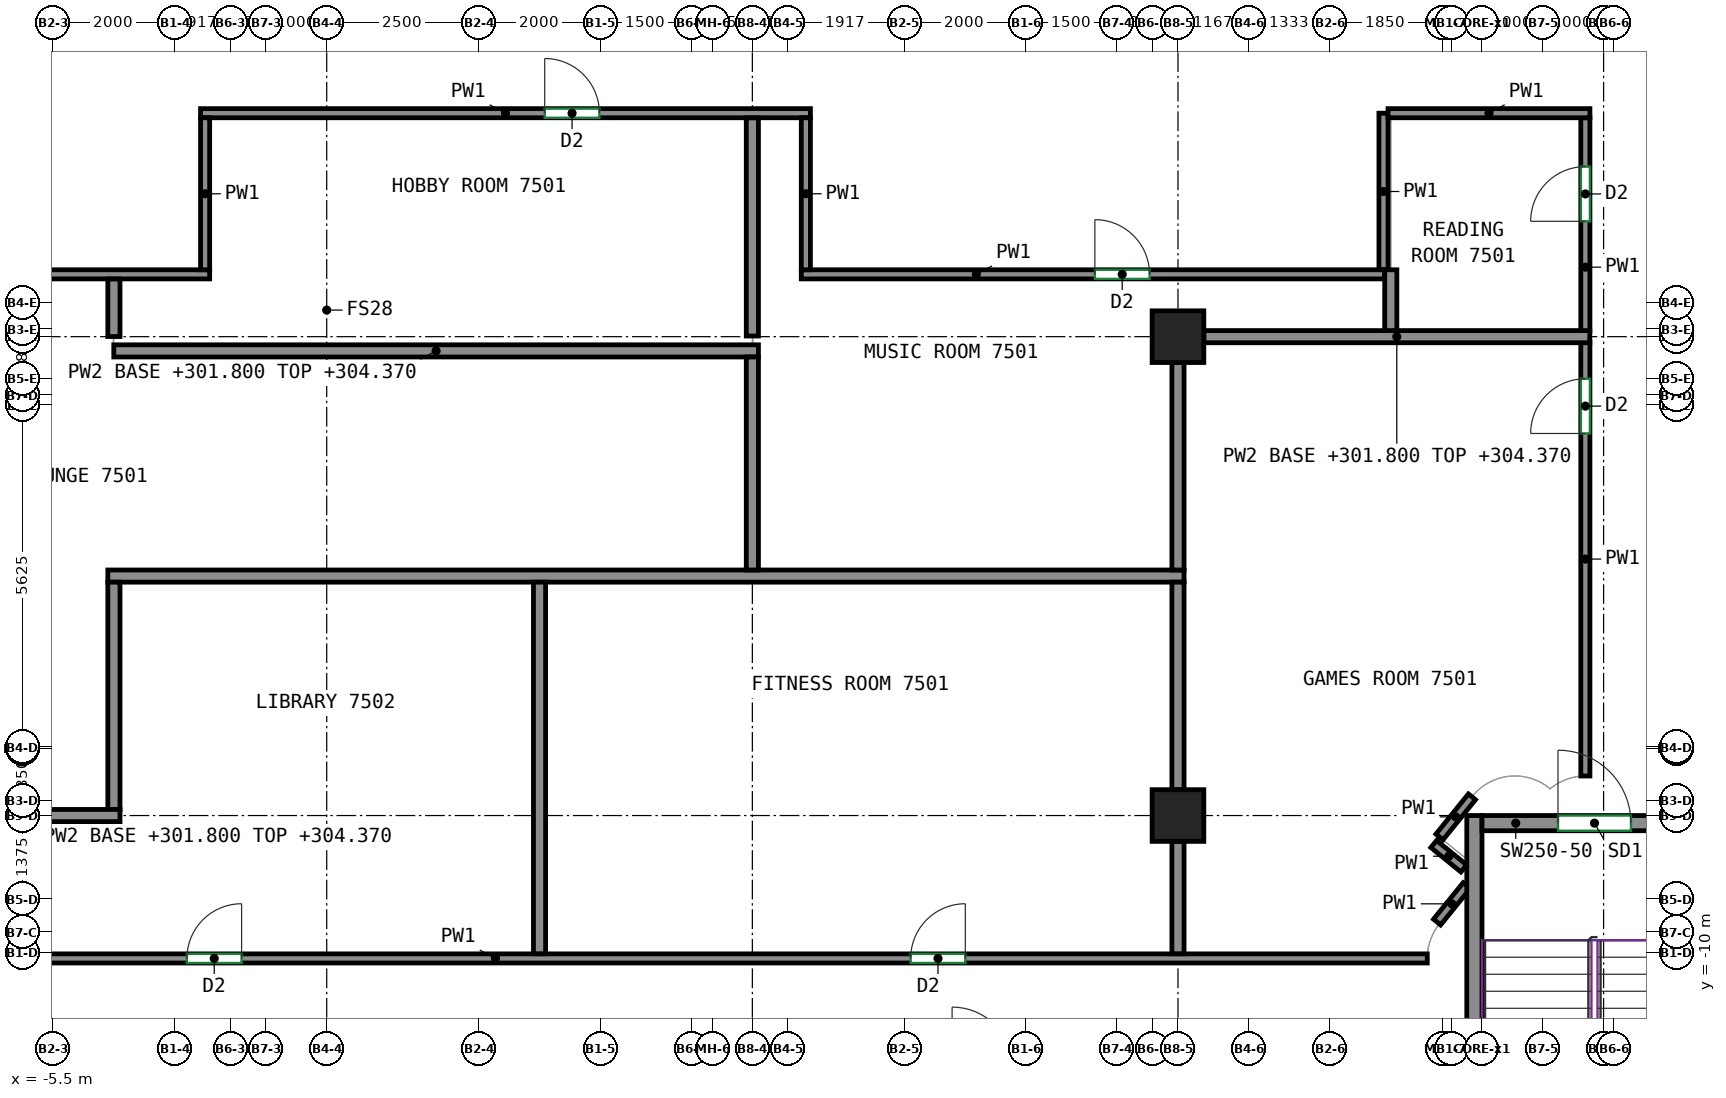
"""IFC4 building model, lengths in metres.
Left out: names, types, materials, properties, quantities, classifications, styles, units other than length and angle.
Written with IfcOpenShell. Run it as: python <this file> out.ifc"""

import sys

from ifc_helpers import new_model, si_unit, direction, frame, frame_2d, origin, origin_2d, place, context, subcontext, project, spatial, rectangle, extrude, source, transform, mapped, element, fill, save


model = new_model("IFC4")
c1 = context("Model", 3, precision=1e-05, world=origin(), true_north=direction((0.0, 1.0)))
c2 = subcontext(c1, "Body", "Model", "MODEL_VIEW")
j1 = project(units=[si_unit("LENGTHUNIT", "METRE"), si_unit("PLANEANGLEUNIT", "RADIAN")], contexts=[c1])
p1 = place(None, origin())
s1 = spatial("IfcSite", under=j1, at=p1, CompositionType="ELEMENT")
p2 = place(p1, origin())
s2 = spatial("IfcBuilding", under=s1, at=p2, CompositionType="ELEMENT")
p3 = place(p2, frame((0.0, 0.0, 301.8)))
s3 = spatial("IfcBuildingStorey", under=s2, at=p3, CompositionType="ELEMENT", Elevation=301.8)
m1 = source(origin(), c2, "Body", "SweptSolid", [
    extrude(rectangle(XDim=0.85, YDim=0.85, at=origin_2d()), origin(), (0.0, 0.0, 1.0), 3.12),
])
for number, where, z_axis, x_axis in (
    (1, (13.0, -7.75, 0.0), (0.0, 0.0, 1.0), (1.0, 0.0, 0.0)),
    (2, (13.0, 0.125, 0.0), (0.0, 0.0, 1.0), (1.0, 0.0, 0.0)),
):
    element("IfcColumn", number, at=place(p3, frame(where, z_axis=z_axis, x_axis=x_axis)), inside=s3, PredefinedType="COLUMN", context=c2, shape_type="MappedRepresentation", body=[
        mapped(m1, transform((0.0, 0.0, 0.0))),
    ])
m2 = source(origin(), c2, "Body", "SweptSolid", [
    extrude(rectangle(XDim=8.0, YDim=0.25, at=frame_2d((4.0, 0.0))), origin(), (0.0, 0.0, 1.0), 3.12),
])
p4 = place(p3, frame((17.875, -15.75, 0.0), z_axis=(0.0, 0.0, 1.0), x_axis=(0.0, 1.0, 0.0)))
e3 = element("IfcWall", 3, at=p4, inside=s3, PredefinedType="SHEAR", context=c2, shape_type="MappedRepresentation", body=[
    mapped(m2, transform((0.0, 0.0, 0.0))),
])
m3 = source(origin(), c2, "Body", "SweptSolid", [
    extrude(rectangle(XDim=3.7, YDim=0.25, at=frame_2d((1.85, 0.0))), origin(), (0.0, 0.0, 1.0), 3.12),
])
p5 = place(p3, frame((18.0, -7.875, 0.0), z_axis=(0.0, 0.0, 1.0), x_axis=(1.0, 0.0, 0.0)))
e4 = element("IfcWall", 4, at=p5, inside=s3, PredefinedType="SHEAR", context=c2, shape_type="MappedRepresentation", body=[
    mapped(m3, transform((0.0, 0.0, 0.0))),
])
p6 = place(p5, frame((1.25, 0.0, 0.0)))
e5 = element("IfcOpeningElement", 5, at=p6, cuts=e4, PredefinedType="OPENING", context=c2, shape_type="SweptSolid", body=[
    extrude(rectangle(XDim=1.2, YDim=2.1, at=frame_2d((0.6, 1.05))), frame((0.0, 0.135, 0.0), z_axis=(0.0, -1.0, 0.0), x_axis=(1.0, 0.0, 0.0)), (0.0, 0.0, 1.0), 0.27),
])
p7 = place(p3, frame((-14.935, 1.15, 0.0), z_axis=(0.0, 0.0, 1.0), x_axis=(1.0, 0.0, 0.0)))
e6 = element("IfcWall", 6, at=p7, inside=s3, PredefinedType="PARTITIONING", context=c2, shape_type="SweptSolid", body=[
    extrude(rectangle(XDim=12.01, YDim=0.15, at=frame_2d((6.005, 0.0))), origin(), (0.0, 0.0, 1.0), 3.12),
])
p8 = place(p7, frame((3.418, 0.0, 0.0)))
e7 = element("IfcOpeningElement", 7, at=p8, cuts=e6, PredefinedType="OPENING", context=c2, shape_type="SweptSolid", body=[
    extrude(rectangle(XDim=1.8, YDim=2.1, at=frame_2d((0.9, 1.05))), frame((0.0, 0.085, 0.0), z_axis=(0.0, -1.0, 0.0), x_axis=(1.0, 0.0, 0.0)), (0.0, 0.0, 1.0), 0.17),
])
p9 = place(p3, frame((-13.55, -10.1, 0.0), z_axis=(0.0, 0.0, 1.0), x_axis=(1.0, 0.0, 0.0)))
e8 = element("IfcWall", 8, at=p9, inside=s3, PredefinedType="PARTITIONING", context=c2, shape_type="SweptSolid", body=[
    extrude(rectangle(XDim=30.65, YDim=0.15, at=frame_2d((15.325, 0.0))), origin(), (0.0, 0.0, 1.0), 3.12),
])
p10 = place(p9, frame((10.25, 0.0, 0.0)))
e9 = element("IfcOpeningElement", 9, at=p10, cuts=e8, PredefinedType="OPENING", context=c2, shape_type="SweptSolid", body=[
    extrude(rectangle(XDim=0.9, YDim=2.1, at=frame_2d((0.45, 1.05))), frame((0.0, 0.085, 0.0), z_axis=(0.0, -1.0, 0.0), x_axis=(1.0, 0.0, 0.0)), (0.0, 0.0, 1.0), 0.17),
])
p11 = place(p9, frame((22.153, 0.0, 0.0)))
e10 = element("IfcOpeningElement", 10, at=p11, cuts=e8, PredefinedType="OPENING", context=c2, shape_type="SweptSolid", body=[
    extrude(rectangle(XDim=0.9, YDim=2.1, at=frame_2d((0.45, 1.05))), frame((0.0, 0.085, 0.0), z_axis=(0.0, -1.0, 0.0), x_axis=(1.0, 0.0, 0.0)), (0.0, 0.0, 1.0), 0.17),
])
p12 = place(p3, frame((-3.075, 3.8, 0.0), z_axis=(0.0, 0.0, 1.0), x_axis=(1.0, 0.0, 0.0)))
e11 = element("IfcWall", 11, at=p12, inside=s3, PredefinedType="PARTITIONING", context=c2, shape_type="SweptSolid", body=[
    extrude(rectangle(XDim=10.03, YDim=0.15, at=frame_2d((5.015, 0.0))), origin(), (0.0, 0.0, 1.0), 3.12),
])
p13 = place(p12, frame((5.66, 0.0, 0.0)))
e12 = element("IfcOpeningElement", 12, at=p13, cuts=e11, PredefinedType="OPENING", context=c2, shape_type="SweptSolid", body=[
    extrude(rectangle(XDim=0.9, YDim=2.1, at=frame_2d((0.45, 1.05))), frame((0.0, 0.085, 0.0), z_axis=(0.0, -1.0, 0.0), x_axis=(1.0, 0.0, 0.0)), (0.0, 0.0, 1.0), 0.17),
])
p14 = place(p3, frame((-3.0, 1.225, 0.0), z_axis=(0.0, 0.0, 1.0), x_axis=(0.0, 1.0, 0.0)))
e13 = element("IfcWall", 13, at=p14, inside=s3, PredefinedType="PARTITIONING", context=c2, shape_type="SweptSolid", body=[
    extrude(rectangle(XDim=2.5, YDim=0.15, at=frame_2d((1.25, 0.0))), origin(), (0.0, 0.0, 1.0), 3.12),
])
p15 = place(p3, frame((16.38, 1.225, 0.0), z_axis=(0.0, 0.0, 1.0), x_axis=(0.0, 1.0, 0.0)))
e14 = element("IfcWall", 14, at=p15, inside=s3, PredefinedType="PARTITIONING", context=c2, shape_type="SweptSolid", body=[
    extrude(rectangle(XDim=2.575, YDim=0.15, at=frame_2d((1.288, 0.0))), origin(), (0.0, 0.0, 1.0), 3.12),
])
p16 = place(p3, frame((6.805, 1.15, 0.0), z_axis=(0.0, 0.0, 1.0), x_axis=(1.0, 0.0, 0.0)))
e15 = element("IfcWall", 15, at=p16, inside=s3, PredefinedType="PARTITIONING", context=c2, shape_type="SweptSolid", body=[
    extrude(rectangle(XDim=9.595, YDim=0.15, at=frame_2d((4.797, 0.0))), origin(), (0.0, 0.0, 1.0), 3.12),
])
p17 = place(p16, frame((4.828, 0.0, 0.0)))
e16 = element("IfcOpeningElement", 16, at=p17, cuts=e15, PredefinedType="OPENING", context=c2, shape_type="SweptSolid", body=[
    extrude(rectangle(XDim=0.9, YDim=2.1, at=frame_2d((0.45, 1.05))), frame((0.0, 0.085, 0.0), z_axis=(0.0, -1.0, 0.0), x_axis=(1.0, 0.0, 0.0)), (0.0, 0.0, 1.0), 0.17),
])
p18 = place(p3, frame((6.88, 3.725, 0.0), z_axis=(0.0, 0.0, 1.0), x_axis=(0.0, -1.0, 0.0)))
e17 = element("IfcWall", 17, at=p18, inside=s3, PredefinedType="PARTITIONING", context=c2, shape_type="SweptSolid", body=[
    extrude(rectangle(XDim=2.5, YDim=0.15, at=frame_2d((1.25, 0.0))), origin(), (0.0, 0.0, 1.0), 3.12),
])
p19 = place(p3, frame((17.748, -8.902, 0.0), z_axis=(0.0, 0.0, 1.0), x_axis=(-0.630342797145, -0.776316918589, 0.0)))
e18 = element("IfcWall", 18, at=p19, inside=s3, PredefinedType="PARTITIONING", context=c2, shape_type="SweptSolid", body=[
    extrude(rectangle(XDim=0.773, YDim=0.15, at=frame_2d((0.386, 0.0))), origin(), (0.0, 0.0, 1.0), 3.12),
])
p20 = place(p3, frame((17.206, -8.218, 0.0), z_axis=(0.0, 0.0, 1.0), x_axis=(0.776102288291, -0.630607039376, 0.0)))
e19 = element("IfcWall", 19, at=p20, inside=s3, PredefinedType="PARTITIONING", context=c2, shape_type="SweptSolid", body=[
    extrude(rectangle(XDim=0.638, YDim=0.15, at=frame_2d((0.319, 0.0))), origin(), (0.0, 0.0, 1.0), 3.12),
])
p21 = place(p3, frame((17.835, -7.442, 0.0), z_axis=(0.0, 0.0, 1.0), x_axis=(-0.628859024249, -0.777519342281, 0.0)))
e20 = element("IfcWall", 20, at=p21, inside=s3, PredefinedType="PARTITIONING", context=c2, shape_type="SweptSolid", body=[
    extrude(rectangle(XDim=0.849, YDim=0.15, at=frame_2d((0.425, 0.0))), origin(), (0.0, 0.0, 1.0), 3.12),
])
p22 = place(p3, frame((19.7, -7.1, 0.0), z_axis=(0.0, 0.0, 1.0), x_axis=(0.0, 1.0, 0.0)))
e21 = element("IfcWall", 21, at=p22, inside=s3, PredefinedType="PARTITIONING", context=c2, shape_type="SweptSolid", body=[
    extrude(rectangle(XDim=7.135, YDim=0.15, at=frame_2d((3.567, 0.0))), origin(), (0.0, 0.0, 1.0), 3.12),
])
p23 = place(p22, frame((5.633, 0.0, 0.0)))
e22 = element("IfcOpeningElement", 22, at=p23, cuts=e21, PredefinedType="OPENING", context=c2, shape_type="SweptSolid", body=[
    extrude(rectangle(XDim=0.9, YDim=2.1, at=frame_2d((0.45, 1.05))), frame((0.0, 0.085, 0.0), z_axis=(0.0, -1.0, 0.0), x_axis=(1.0, 0.0, 0.0)), (0.0, 0.0, 1.0), 0.17),
])
p24 = place(p3, frame((19.7, 0.215, 0.0), z_axis=(0.0, 0.0, 1.0), x_axis=(0.0, 1.0, 0.0)))
e23 = element("IfcWall", 23, at=p24, inside=s3, PredefinedType="PARTITIONING", context=c2, shape_type="SweptSolid", body=[
    extrude(rectangle(XDim=3.51, YDim=0.15, at=frame_2d((1.755, 0.0))), origin(), (0.0, 0.0, 1.0), 3.12),
])
p25 = place(p24, frame((1.807, 0.0, 0.0)))
e24 = element("IfcOpeningElement", 24, at=p25, cuts=e23, PredefinedType="OPENING", context=c2, shape_type="SweptSolid", body=[
    extrude(rectangle(XDim=0.9, YDim=2.1, at=frame_2d((0.45, 1.05))), frame((0.0, 0.085, 0.0), z_axis=(0.0, -1.0, 0.0), x_axis=(1.0, 0.0, 0.0)), (0.0, 0.0, 1.0), 0.17),
])
p26 = place(p3, frame((16.455, 3.8, 0.0), z_axis=(0.0, 0.0, 1.0), x_axis=(1.0, 0.0, 0.0)))
e25 = element("IfcWall", 25, at=p26, inside=s3, PredefinedType="PARTITIONING", context=c2, shape_type="SweptSolid", body=[
    extrude(rectangle(XDim=3.32, YDim=0.15, at=frame_2d((1.66, 0.0))), origin(), (0.0, 0.0, 1.0), 3.12),
])
p27 = place(p3, frame((-4.6, -3.812, 0.0), z_axis=(0.0, 0.0, 1.0), x_axis=(1.0, 0.0, 0.0)))
e26 = element("IfcWall", 26, at=p27, inside=s3, PredefinedType="PARTITIONING", context=c2, shape_type="SweptSolid", body=[
    extrude(rectangle(XDim=17.7, YDim=0.2, at=frame_2d((8.85, 0.0))), origin(), (0.0, 0.0, 1.0), 3.12),
])
p28 = place(p3, frame((-4.5, -7.65, 0.0), z_axis=(0.0, 0.0, 1.0), x_axis=(0.0, 1.0, 0.0)))
e27 = element("IfcWall", 27, at=p28, inside=s3, PredefinedType="PARTITIONING", context=c2, shape_type="SweptSolid", body=[
    extrude(rectangle(XDim=3.738, YDim=0.2, at=frame_2d((1.869, 0.0))), origin(), (0.0, 0.0, 1.0), 3.12),
])
p29 = place(p3, frame((-7.575, -7.75, 0.0), z_axis=(0.0, 0.0, 1.0), x_axis=(1.0, 0.0, 0.0)))
e28 = element("IfcWall", 28, at=p29, inside=s3, PredefinedType="PARTITIONING", context=c2, shape_type="SweptSolid", body=[
    extrude(rectangle(XDim=3.175, YDim=0.2, at=frame_2d((1.587, 0.0))), origin(), (0.0, 0.0, 1.0), 2.57),
])
p30 = place(p3, frame((-4.5, 0.127, 0.0), z_axis=(0.0, 0.0, 1.0), x_axis=(0.0, 1.0, 0.0)))
e29 = element("IfcWall", 29, at=p30, inside=s3, PredefinedType="PARTITIONING", context=c2, shape_type="SweptSolid", body=[
    extrude(rectangle(XDim=0.946, YDim=0.2, at=frame_2d((0.473, 0.0))), origin(), (0.0, 0.0, 1.0), 3.12),
])
p31 = place(p3, frame((6.1, -0.109, 0.0), z_axis=(0.0, 0.0, 1.0), x_axis=(-1.0, 0.0, 0.0)))
e30 = element("IfcWall", 30, at=p31, inside=s3, PredefinedType="PARTITIONING", context=c2, shape_type="SweptSolid", body=[
    extrude(rectangle(XDim=10.602, YDim=0.2, at=frame_2d((5.301, 0.0))), origin(), (0.0, 0.0, 1.0), 2.57),
])
p32 = place(p3, frame((6.0, -3.712, 0.0), z_axis=(0.0, 0.0, 1.0), x_axis=(0.0, 1.0, 0.0)))
e31 = element("IfcWall", 31, at=p32, inside=s3, PredefinedType="PARTITIONING", context=c2, shape_type="SweptSolid", body=[
    extrude(rectangle(XDim=3.503, YDim=0.2, at=frame_2d((1.751, 0.0))), origin(), (0.0, 0.0, 1.0), 3.12),
])
p33 = place(p3, frame((2.5, -10.023, 0.0), z_axis=(0.0, 0.0, 1.0), x_axis=(0.0, 1.0, 0.0)))
e32 = element("IfcWall", 32, at=p33, inside=s3, PredefinedType="PARTITIONING", context=c2, shape_type="SweptSolid", body=[
    extrude(rectangle(XDim=6.111, YDim=0.2, at=frame_2d((3.055, 0.0))), origin(), (0.0, 0.0, 1.0), 3.12),
])
p34 = place(p3, frame((6.0, 0.136, 0.0), z_axis=(0.0, 0.0, 1.0), x_axis=(0.0, 1.0, 0.0)))
e33 = element("IfcWall", 33, at=p34, inside=s3, PredefinedType="PARTITIONING", context=c2, shape_type="SweptSolid", body=[
    extrude(rectangle(XDim=3.587, YDim=0.2, at=frame_2d((1.793, 0.0))), origin(), (0.0, 0.0, 1.0), 3.12),
])
p35 = place(p3, frame((13.0, -7.325, 0.0), z_axis=(0.0, 0.0, 1.0), x_axis=(0.0, 1.0, 0.0)))
e34 = element("IfcWall", 34, at=p35, inside=s3, PredefinedType="PARTITIONING", context=c2, shape_type="SweptSolid", body=[
    extrude(rectangle(XDim=3.413, YDim=0.2, at=frame_2d((1.707, 0.0))), origin(), (0.0, 0.0, 1.0), 3.12),
])
p36 = place(p3, frame((13.0, -10.023, 0.0), z_axis=(0.0, 0.0, 1.0), x_axis=(0.0, 1.0, 0.0)))
e35 = element("IfcWall", 35, at=p36, inside=s3, PredefinedType="PARTITIONING", context=c2, shape_type="SweptSolid", body=[
    extrude(rectangle(XDim=1.848, YDim=0.2, at=frame_2d((0.924, 0.0))), origin(), (0.0, 0.0, 1.0), 3.12),
])
p37 = place(p3, frame((13.425, 0.125, 0.0), z_axis=(0.0, 0.0, 1.0), x_axis=(1.0, 0.0, 0.0)))
e36 = element("IfcWall", 36, at=p37, inside=s3, PredefinedType="PARTITIONING", context=c2, shape_type="SweptSolid", body=[
    extrude(rectangle(XDim=6.348, YDim=0.2, at=frame_2d((3.174, 0.0))), origin(), (0.0, 0.0, 1.0), 2.57),
])
p38 = place(p3, frame((13.0, -3.712, 0.0), z_axis=(0.0, 0.0, 1.0), x_axis=(0.0, 1.0, 0.0)))
e37 = element("IfcWall", 37, at=p38, inside=s3, PredefinedType="PARTITIONING", context=c2, shape_type="SweptSolid", body=[
    extrude(rectangle(XDim=3.412, YDim=0.2, at=frame_2d((1.706, 0.0))), origin(), (0.0, 0.0, 1.0), 3.12),
])
p39 = place(p3, frame((16.5, 0.225, 0.0), z_axis=(0.0, 0.0, 1.0), x_axis=(0.0, 1.0, 0.0)))
e38 = element("IfcWall", 38, at=p39, inside=s3, PredefinedType="PARTITIONING", context=c2, shape_type="SweptSolid", body=[
    extrude(rectangle(XDim=1.0, YDim=0.2, at=frame_2d((0.5, 0.0))), origin(), (0.0, 0.0, 1.0), 3.12),
])
p40 = place(p6, origin())
e39 = element("IfcDoor", 39, at=p40, inside=s3, OperationType="DOUBLE_DOOR_SINGLE_SWING", PredefinedType="DOOR", context=c2, shape_type="SweptSolid", body=[
    extrude(rectangle(XDim=1.2, YDim=2.1, at=frame_2d((0.6, 1.05))), frame((0.0, 0.025, 0.0), z_axis=(0.0, -1.0, 0.0), x_axis=(1.0, 0.0, 0.0)), (0.0, 0.0, 1.0), 0.05),
])
fill(e5, e39)
p41 = place(p10, origin())
e40 = element("IfcDoor", 40, at=p41, inside=s3, OperationType="SINGLE_SWING_RIGHT", PredefinedType="DOOR", context=c2, shape_type="SweptSolid", body=[
    extrude(rectangle(XDim=0.9, YDim=2.1, at=frame_2d((0.45, 1.05))), frame((0.0, 0.025, 0.0), z_axis=(0.0, -1.0, 0.0), x_axis=(1.0, 0.0, 0.0)), (0.0, 0.0, 1.0), 0.05),
])
fill(e9, e40)
p42 = place(p11, origin())
e41 = element("IfcDoor", 41, at=p42, inside=s3, OperationType="SINGLE_SWING_RIGHT", PredefinedType="DOOR", context=c2, shape_type="SweptSolid", body=[
    extrude(rectangle(XDim=0.9, YDim=2.1, at=frame_2d((0.45, 1.05))), frame((0.0, 0.025, 0.0), z_axis=(0.0, -1.0, 0.0), x_axis=(1.0, 0.0, 0.0)), (0.0, 0.0, 1.0), 0.05),
])
fill(e10, e41)
p43 = place(p23, origin())
e42 = element("IfcDoor", 42, at=p43, inside=s3, OperationType="SINGLE_SWING_LEFT", PredefinedType="DOOR", context=c2, shape_type="SweptSolid", body=[
    extrude(rectangle(XDim=0.9, YDim=2.1, at=frame_2d((0.45, 1.05))), frame((0.0, 0.025, 0.0), z_axis=(0.0, -1.0, 0.0), x_axis=(1.0, 0.0, 0.0)), (0.0, 0.0, 1.0), 0.05),
])
fill(e22, e42)
p44 = place(p17, origin())
e43 = element("IfcDoor", 43, at=p44, inside=s3, OperationType="SINGLE_SWING_LEFT", PredefinedType="DOOR", context=c2, shape_type="SweptSolid", body=[
    extrude(rectangle(XDim=0.9, YDim=2.1, at=frame_2d((0.45, 1.05))), frame((0.0, 0.025, 0.0), z_axis=(0.0, -1.0, 0.0), x_axis=(1.0, 0.0, 0.0)), (0.0, 0.0, 1.0), 0.05),
])
fill(e16, e43)
p45 = place(p25, origin())
e44 = element("IfcDoor", 44, at=p45, inside=s3, OperationType="SINGLE_SWING_LEFT", PredefinedType="DOOR", context=c2, shape_type="SweptSolid", body=[
    extrude(rectangle(XDim=0.9, YDim=2.1, at=frame_2d((0.45, 1.05))), frame((0.0, 0.025, 0.0), z_axis=(0.0, -1.0, 0.0), x_axis=(1.0, 0.0, 0.0)), (0.0, 0.0, 1.0), 0.05),
])
fill(e24, e44)
p46 = place(p13, origin())
e45 = element("IfcDoor", 45, at=p46, inside=s3, OperationType="SINGLE_SWING_LEFT", PredefinedType="DOOR", context=c2, shape_type="SweptSolid", body=[
    extrude(rectangle(XDim=0.9, YDim=2.1, at=frame_2d((0.45, 1.05))), frame((0.0, 0.025, 0.0), z_axis=(0.0, -1.0, 0.0), x_axis=(1.0, 0.0, 0.0)), (0.0, 0.0, 1.0), 0.05),
])
fill(e12, e45)
save(model, sys.argv[1])
